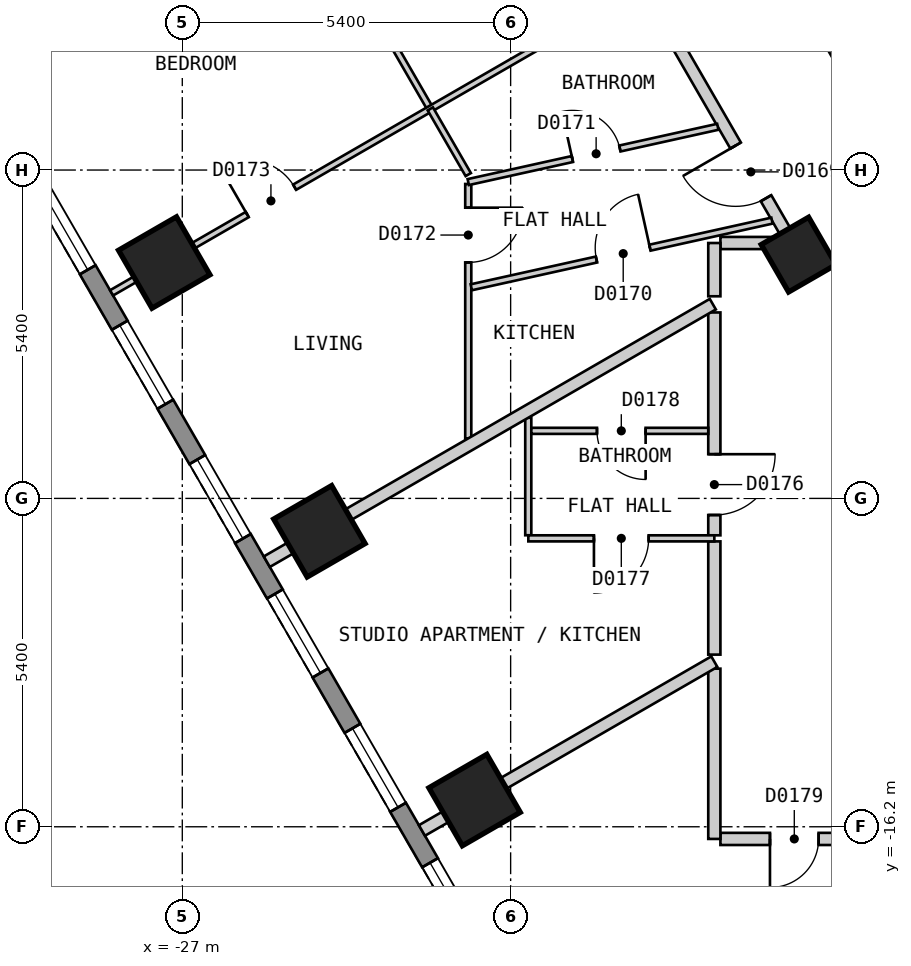
"""IFC4 building model, lengths in metres.
Left out: names, types, materials, properties, quantities, classifications, styles, units other than length and angle.
Written with IfcOpenShell. Run it as: python <this file> out.ifc"""

import sys

from ifc_helpers import new_model, si_unit, direction, frame, frame_2d, origin, origin_2d, place, context, subcontext, project, spatial, polyline, rectangle, outline, extrude, element, fill, save


model = new_model("IFC4")
c1 = context("Model", 3, precision=1e-05, world=origin(), true_north=direction((0.0, 1.0)))
c2 = subcontext(c1, "Body", "Model", "MODEL_VIEW")
j1 = project(units=[si_unit("LENGTHUNIT", "METRE"), si_unit("PLANEANGLEUNIT", "RADIAN")], contexts=[c1])
p1 = place(None, origin())
s1 = spatial("IfcSite", under=j1, at=p1, CompositionType="ELEMENT")
p2 = place(p1, origin())
s2 = spatial("IfcBuilding", under=s1, at=p2, CompositionType="ELEMENT")
p3 = place(p2, frame((0.0, 0.0, 29.4)))
s3 = spatial("IfcBuildingStorey", under=s2, at=p3, CompositionType="ELEMENT", Elevation=29.4)
for number, where, z_axis, x_axis in (
    (1, (-27.297, -6.921, 0.0), (0.0, 0.0, 1.0), (0.5, -0.866, 0.0)),
    (2, (-24.745, -11.341, 0.0), (0.0, 0.0, 1.0), (0.5, -0.866, 0.0)),
    (3, (-22.193, -15.761, 0.0), (0.0, 0.0, 1.0), (0.5, -0.866, 0.0)),
):
    element("IfcColumn", number, at=place(p3, frame(where, z_axis=z_axis, x_axis=x_axis)), inside=s3, PredefinedType="COLUMN", context=c2, shape_type="SweptSolid", body=[
        extrude(rectangle(XDim=1.1, YDim=1.1, at=origin_2d()), origin(), (0.0, 0.0, 1.0), 3.0),
    ])
p4 = place(p3, frame((-16.864, -6.791, 0.0), z_axis=(0.0, 0.0, 1.0), x_axis=(0.499984884929, -0.866034130299, 0.0)))
e4 = element("IfcColumn", 4, at=p4, inside=s3, PredefinedType="COLUMN", context=c2, shape_type="SweptSolid", body=[
    extrude(rectangle(XDim=0.9, YDim=0.9, at=origin_2d()), origin(), (0.0, 0.0, 1.0), 3.0),
])
p5 = place(p3, frame((-31.22, -2.425, 0.0), z_axis=(0.0, 0.0, 1.0), x_axis=(0.500001938803, -0.866024284413, 0.0)))
e5 = element("IfcWall", 5, at=p5, inside=s3, PredefinedType="SOLIDWALL", context=c2, shape_type="SweptSolid", body=[
    extrude(outline(polyline([(0.0, -0.15), (27.02, -0.15), (26.94, 0.15), (0.08, 0.15), (0.0, -0.15)])), origin(), (0.0, 0.0, 1.0), 2.7),
])
p6 = place(p5, frame((1.277, 0.0, 0.15)))
e6 = element("IfcOpeningElement", 6, at=p6, cuts=e5, PredefinedType="OPENING", context=c2, shape_type="SweptSolid", body=[
    extrude(rectangle(XDim=1.5, YDim=2.1, at=frame_2d((0.75, 1.05))), frame((0.0, 0.16, 0.0), z_axis=(0.0, -1.0, 0.0), x_axis=(1.0, 0.0, 0.0)), (0.0, 0.0, 1.0), 0.32),
])
p7 = place(p5, frame((3.829, 0.0, 0.15)))
e7 = element("IfcOpeningElement", 7, at=p7, cuts=e5, PredefinedType="OPENING", context=c2, shape_type="SweptSolid", body=[
    extrude(rectangle(XDim=1.5, YDim=2.1, at=frame_2d((0.75, 1.05))), frame((0.0, 0.16, 0.0), z_axis=(0.0, -1.0, 0.0), x_axis=(1.0, 0.0, 0.0)), (0.0, 0.0, 1.0), 0.32),
])
p8 = place(p5, frame((6.382, 0.0, 0.15)))
e8 = element("IfcOpeningElement", 8, at=p8, cuts=e5, PredefinedType="OPENING", context=c2, shape_type="SweptSolid", body=[
    extrude(rectangle(XDim=1.5, YDim=2.1, at=frame_2d((0.75, 1.05))), frame((0.0, 0.16, 0.0), z_axis=(0.0, -1.0, 0.0), x_axis=(1.0, 0.0, 0.0)), (0.0, 0.0, 1.0), 0.32),
])
p9 = place(p5, frame((8.933, 0.0, 0.15)))
e9 = element("IfcOpeningElement", 9, at=p9, cuts=e5, PredefinedType="OPENING", context=c2, shape_type="SweptSolid", body=[
    extrude(rectangle(XDim=1.5, YDim=2.1, at=frame_2d((0.75, 1.05))), frame((0.0, 0.16, 0.0), z_axis=(0.0, -1.0, 0.0), x_axis=(1.0, 0.0, 0.0)), (0.0, 0.0, 1.0), 0.32),
])
p10 = place(p5, frame((11.485, 0.0, 0.15)))
e10 = element("IfcOpeningElement", 10, at=p10, cuts=e5, PredefinedType="OPENING", context=c2, shape_type="SweptSolid", body=[
    extrude(rectangle(XDim=1.5, YDim=2.1, at=frame_2d((0.75, 1.05))), frame((0.0, 0.16, 0.0), z_axis=(0.0, -1.0, 0.0), x_axis=(1.0, 0.0, 0.0)), (0.0, 0.0, 1.0), 0.32),
])
p11 = place(p5, frame((14.037, 0.0, 0.15)))
e11 = element("IfcOpeningElement", 11, at=p11, cuts=e5, PredefinedType="OPENING", context=c2, shape_type="SweptSolid", body=[
    extrude(rectangle(XDim=1.5, YDim=2.1, at=frame_2d((0.75, 1.05))), frame((0.0, 0.16, 0.0), z_axis=(0.0, -1.0, 0.0), x_axis=(1.0, 0.0, 0.0)), (0.0, 0.0, 1.0), 0.32),
])
p12 = place(p5, frame((16.589, 0.0, 0.15)))
e12 = element("IfcOpeningElement", 12, at=p12, cuts=e5, PredefinedType="OPENING", context=c2, shape_type="SweptSolid", body=[
    extrude(rectangle(XDim=1.5, YDim=2.1, at=frame_2d((0.75, 1.05))), frame((0.0, 0.16, 0.0), z_axis=(0.0, -1.0, 0.0), x_axis=(1.0, 0.0, 0.0)), (0.0, 0.0, 1.0), 0.32),
])
p13 = place(p5, frame((19.141, 0.0, 0.15)))
e13 = element("IfcOpeningElement", 13, at=p13, cuts=e5, PredefinedType="OPENING", context=c2, shape_type="SweptSolid", body=[
    extrude(rectangle(XDim=1.5, YDim=2.1, at=frame_2d((0.75, 1.05))), frame((0.0, 0.16, 0.0), z_axis=(0.0, -1.0, 0.0), x_axis=(1.0, 0.0, 0.0)), (0.0, 0.0, 1.0), 0.32),
])
p14 = place(p5, frame((21.693, 0.0, 0.15)))
e14 = element("IfcOpeningElement", 14, at=p14, cuts=e5, PredefinedType="OPENING", context=c2, shape_type="SweptSolid", body=[
    extrude(rectangle(XDim=1.5, YDim=2.1, at=frame_2d((0.75, 1.05))), frame((0.0, 0.16, 0.0), z_axis=(0.0, -1.0, 0.0), x_axis=(1.0, 0.0, 0.0)), (0.0, 0.0, 1.0), 0.32),
])
p15 = place(p5, frame((24.244, 0.0, 0.15)))
e15 = element("IfcOpeningElement", 15, at=p15, cuts=e5, PredefinedType="OPENING", context=c2, shape_type="SweptSolid", body=[
    extrude(rectangle(XDim=1.5, YDim=2.1, at=frame_2d((0.75, 1.05))), frame((0.0, 0.16, 0.0), z_axis=(0.0, -1.0, 0.0), x_axis=(1.0, 0.0, 0.0)), (0.0, 0.0, 1.0), 0.32),
])
p16 = place(p3, frame((-18.186, -0.101, 0.0), z_axis=(0.0, 0.0, 1.0), x_axis=(0.499997591167, -0.86602679452, 0.0)))
e16 = element("IfcWall", 16, at=p16, inside=s3, PredefinedType="PARTITIONING", context=c2, shape_type="SweptSolid", body=[
    extrude(rectangle(XDim=5.172, YDim=0.2, at=frame_2d((2.586, 0.0))), origin(), (0.0, 0.0, 1.0), 2.7),
])
p17 = place(p3, frame((-20.727, -0.101, 0.0), z_axis=(0.0, 0.0, 1.0), x_axis=(0.500065652488, -0.865987495984, 0.0)))
e17 = element("IfcWall", 17, at=p17, inside=s3, PredefinedType="PARTITIONING", context=c2, shape_type="SweptSolid", body=[
    extrude(rectangle(XDim=7.389, YDim=0.2, at=frame_2d((3.695, 0.0))), origin(), (0.0, 0.0, 1.0), 2.7),
])
p18 = place(p17, frame((5.654, 0.0, 0.0)))
e18 = element("IfcOpeningElement", 18, at=p18, cuts=e17, PredefinedType="OPENING", context=c2, shape_type="SweptSolid", body=[
    extrude(rectangle(XDim=1.0, YDim=2.1, at=frame_2d((0.5, 1.05))), frame((0.0, 0.11, 0.0), z_axis=(0.0, -1.0, 0.0), x_axis=(1.0, 0.0, 0.0)), (0.0, 0.0, 1.0), 0.22),
])
p19 = place(p3, frame((-18.25, -11.507, 0.0), z_axis=(0.0, 0.0, 1.0), x_axis=(0.0, -1.0, 0.0)))
e19 = element("IfcWall", 19, at=p19, inside=s3, PredefinedType="PARTITIONING", context=c2, shape_type="SweptSolid", body=[
    extrude(rectangle(XDim=1.862, YDim=0.2, at=frame_2d((0.931, 0.0))), origin(), (0.0, 0.0, 1.0), 2.7),
])
p20 = place(p3, frame((-18.15, -6.6, 0.0), z_axis=(0.0, 0.0, 1.0), x_axis=(1.0, 0.0, 0.0)))
e20 = element("IfcWall", 20, at=p20, inside=s3, PredefinedType="PARTITIONING", context=c2, shape_type="SweptSolid", body=[
    extrude(rectangle(XDim=1.176, YDim=0.2, at=frame_2d((0.588, 0.0))), origin(), (0.0, 0.0, 1.0), 2.7),
])
p21 = place(p3, frame((-18.15, -16.4, 0.0), z_axis=(0.0, 0.0, 1.0), x_axis=(1.0, 0.0, 0.0)))
e21 = element("IfcWall", 21, at=p21, inside=s3, PredefinedType="PARTITIONING", context=c2, shape_type="SweptSolid", body=[
    extrude(rectangle(XDim=2.55, YDim=0.2, at=frame_2d((1.275, 0.0))), origin(), (0.0, 0.0, 1.0), 2.7),
])
p22 = place(p21, frame((0.815, 0.0, 0.0)))
e22 = element("IfcOpeningElement", 22, at=p22, cuts=e21, PredefinedType="OPENING", context=c2, shape_type="SweptSolid", body=[
    extrude(rectangle(XDim=0.8, YDim=2.1, at=frame_2d((0.4, 1.05))), frame((0.0, 0.11, 0.0), z_axis=(0.0, -1.0, 0.0), x_axis=(1.0, 0.0, 0.0)), (0.0, 0.0, 1.0), 0.22),
])
p23 = place(p3, frame((-18.25, -16.4, 0.0), z_axis=(0.0, 0.0, 1.0), x_axis=(0.0, 1.0, 0.0)))
e23 = element("IfcWall", 23, at=p23, inside=s3, PredefinedType="PARTITIONING", context=c2, shape_type="SweptSolid", body=[
    extrude(rectangle(XDim=2.8, YDim=0.2, at=frame_2d((1.4, 0.0))), origin(), (0.0, 0.0, 1.0), 2.7),
])
p24 = place(p3, frame((-18.25, -11.407, 0.0), z_axis=(0.0, 0.0, 1.0), x_axis=(0.0, 1.0, 0.0)))
e24 = element("IfcWall", 24, at=p24, inside=s3, PredefinedType="PARTITIONING", context=c2, shape_type="SweptSolid", body=[
    extrude(rectangle(XDim=3.665, YDim=0.2, at=frame_2d((1.833, 0.0))), origin(), (0.0, 0.0, 1.0), 2.7),
])
p25 = place(p24, frame((0.334, 0.0, 0.0)))
e25 = element("IfcOpeningElement", 25, at=p25, cuts=e24, PredefinedType="OPENING", context=c2, shape_type="SweptSolid", body=[
    extrude(rectangle(XDim=1.0, YDim=2.1, at=frame_2d((0.5, 1.05))), frame((0.0, 0.11, 0.0), z_axis=(0.0, -1.0, 0.0), x_axis=(1.0, 0.0, 0.0)), (0.0, 0.0, 1.0), 0.22),
])
p26 = place(p3, frame((-18.25, -7.476, 0.0), z_axis=(0.0, 0.0, 1.0), x_axis=(0.0, 1.0, 0.0)))
e26 = element("IfcWall", 26, at=p26, inside=s3, PredefinedType="PARTITIONING", context=c2, shape_type="SweptSolid", body=[
    extrude(rectangle(XDim=0.876, YDim=0.2, at=frame_2d((0.438, 0.0))), origin(), (0.0, 0.0, 1.0), 2.7),
])
p27 = place(p3, frame((-25.358, -0.174, 0.0), z_axis=(0.0, 0.0, 1.0), x_axis=(0.500093956194, -0.865971151354, 0.0)))
e27 = element("IfcWall", 27, at=p27, inside=s3, PredefinedType="PARTITIONING", context=c2, shape_type="SweptSolid", body=[
    extrude(rectangle(XDim=4.873, YDim=0.1, at=frame_2d((2.437, 0.0))), origin(), (0.0, 0.0, 1.0), 2.7),
])
p28 = place(p27, frame((1.937, 0.0, 0.0)))
e28 = element("IfcOpeningElement", 28, at=p28, cuts=e27, PredefinedType="OPENING", context=c2, shape_type="SweptSolid", body=[
    extrude(rectangle(XDim=0.8, YDim=2.1, at=frame_2d((0.4, 1.05))), frame((0.0, 0.06, 0.0), z_axis=(0.0, -1.0, 0.0), x_axis=(1.0, 0.0, 0.0)), (0.0, 0.0, 1.0), 0.12),
])
p29 = place(p3, frame((-21.31, -9.474, 0.0), z_axis=(0.0, 0.0, 1.0), x_axis=(0.0, -1.0, 0.0)))
e29 = element("IfcWall", 29, at=p29, inside=s3, PredefinedType="PARTITIONING", context=c2, shape_type="SweptSolid", body=[
    extrude(rectangle(XDim=1.932, YDim=0.1, at=frame_2d((0.966, 0.0))), origin(), (0.0, 0.0, 1.0), 2.7),
])
p30 = place(p3, frame((-21.26, -9.689, 0.0), z_axis=(0.0, 0.0, 1.0), x_axis=(1.0, 0.0, 0.0)))
e30 = element("IfcWall", 30, at=p30, inside=s3, PredefinedType="PARTITIONING", context=c2, shape_type="SweptSolid", body=[
    extrude(rectangle(XDim=2.91, YDim=0.1, at=frame_2d((1.455, 0.0))), origin(), (0.0, 0.0, 1.0), 2.7),
])
p31 = place(p30, frame((1.08, 0.0, 0.0)))
e31 = element("IfcOpeningElement", 31, at=p31, cuts=e30, PredefinedType="OPENING", context=c2, shape_type="SweptSolid", body=[
    extrude(rectangle(XDim=0.8, YDim=2.1, at=frame_2d((0.4, 1.05))), frame((0.0, 0.06, 0.0), z_axis=(0.0, -1.0, 0.0), x_axis=(1.0, 0.0, 0.0)), (0.0, 0.0, 1.0), 0.12),
])
p32 = place(p3, frame((-21.309, -11.457, 0.0), z_axis=(0.0, 0.0, 1.0), x_axis=(1.0, 0.0, 0.0)))
e32 = element("IfcWall", 32, at=p32, inside=s3, PredefinedType="PARTITIONING", context=c2, shape_type="SweptSolid", body=[
    extrude(rectangle(XDim=3.059, YDim=0.1, at=frame_2d((1.53, 0.0))), origin(), (0.0, 0.0, 1.0), 2.7),
])
p33 = place(p32, frame((1.079, 0.0, 0.0)))
e33 = element("IfcOpeningElement", 33, at=p33, cuts=e32, PredefinedType="OPENING", context=c2, shape_type="SweptSolid", body=[
    extrude(rectangle(XDim=0.9, YDim=2.1, at=frame_2d((0.45, 1.05))), frame((0.0, 0.06, 0.0), z_axis=(0.0, -1.0, 0.0), x_axis=(1.0, 0.0, 0.0)), (0.0, 0.0, 1.0), 0.12),
])
p34 = place(p3, frame((-22.297, -9.813, 0.0), z_axis=(0.0, 0.0, 1.0), x_axis=(0.0, 1.0, 0.0)))
e34 = element("IfcWall", 34, at=p34, inside=s3, PredefinedType="PARTITIONING", context=c2, shape_type="SweptSolid", body=[
    extrude(rectangle(XDim=4.184, YDim=0.1, at=frame_2d((2.092, 0.0))), origin(), (0.0, 0.0, 1.0), 2.7),
])
p35 = place(p34, frame((2.894, 0.0, 0.0)))
e35 = element("IfcOpeningElement", 35, at=p35, cuts=e34, PredefinedType="OPENING", context=c2, shape_type="SweptSolid", body=[
    extrude(rectangle(XDim=0.9, YDim=2.1, at=frame_2d((0.45, 1.05))), frame((0.0, 0.06, 0.0), z_axis=(0.0, -1.0, 0.0), x_axis=(1.0, 0.0, 0.0)), (0.0, 0.0, 1.0), 0.12),
])
p36 = place(p3, frame((-22.297, -5.598, 0.0), z_axis=(0.0, 0.0, 1.0), x_axis=(0.976341239907, 0.216235481033, 0.0)))
e36 = element("IfcWall", 36, at=p36, inside=s3, PredefinedType="PARTITIONING", context=c2, shape_type="SweptSolid", body=[
    extrude(rectangle(XDim=4.203, YDim=0.1, at=frame_2d((2.102, 0.0))), origin(), (0.0, 0.0, 1.0), 2.7),
])
p37 = place(p36, frame((1.754, 0.0, 0.0)))
e37 = element("IfcOpeningElement", 37, at=p37, cuts=e36, PredefinedType="OPENING", context=c2, shape_type="SweptSolid", body=[
    extrude(rectangle(XDim=0.8, YDim=2.1, at=frame_2d((0.4, 1.05))), frame((0.0, 0.06, 0.0), z_axis=(0.0, -1.0, 0.0), x_axis=(1.0, 0.0, 0.0)), (0.0, 0.0, 1.0), 0.12),
])
p38 = place(p3, frame((-22.247, -7.328, 0.0), z_axis=(0.0, 0.0, 1.0), x_axis=(0.976310522972, 0.216374126765, 0.0)))
e38 = element("IfcWall", 38, at=p38, inside=s3, PredefinedType="PARTITIONING", context=c2, shape_type="SweptSolid", body=[
    extrude(rectangle(XDim=5.065, YDim=0.1, at=frame_2d((2.532, 0.0))), origin(), (0.0, 0.0, 1.0), 2.7),
])
p39 = place(p38, frame((2.109, 0.0, 0.0)))
e39 = element("IfcOpeningElement", 39, at=p39, cuts=e38, PredefinedType="OPENING", context=c2, shape_type="SweptSolid", body=[
    extrude(rectangle(XDim=0.9, YDim=2.1, at=frame_2d((0.45, 1.05))), frame((0.0, 0.06, 0.0), z_axis=(0.0, -1.0, 0.0), x_axis=(1.0, 0.0, 0.0)), (0.0, 0.0, 1.0), 0.12),
])
p40 = place(p3, frame((-28.163, -7.42, 0.0), z_axis=(0.0, 0.0, 1.0), x_axis=(0.866065245018, 0.499930986609, 0.0)))
e40 = element("IfcWall", 40, at=p40, inside=s3, PredefinedType="PARTITIONING", context=c2, shape_type="SweptSolid", body=[
    extrude(rectangle(XDim=10.0, YDim=0.1, at=frame_2d((5.0, 0.0))), origin(), (0.0, 0.0, 1.0), 2.7),
])
p41 = place(p40, frame((2.576, 0.0, 0.0)))
e41 = element("IfcOpeningElement", 41, at=p41, cuts=e40, PredefinedType="OPENING", context=c2, shape_type="SweptSolid", body=[
    extrude(rectangle(XDim=0.9, YDim=2.1, at=frame_2d((0.45, 1.05))), frame((0.0, 0.06, 0.0), z_axis=(0.0, -1.0, 0.0), x_axis=(1.0, 0.0, 0.0)), (0.0, 0.0, 1.0), 0.12),
])
p42 = place(p3, frame((-23.059, -16.261, 0.0), z_axis=(0.0, 0.0, 1.0), x_axis=(0.866075767886, 0.499912756669, 0.0)))
e42 = element("IfcWall", 42, at=p42, inside=s3, PredefinedType="PARTITIONING", context=c2, shape_type="SweptSolid", body=[
    extrude(rectangle(XDim=5.553, YDim=0.2, at=frame_2d((2.776, 0.0))), origin(), (0.0, 0.0, 1.0), 2.7),
])
p43 = place(p3, frame((-25.61, -11.841, 0.0), z_axis=(0.0, 0.0, 1.0), x_axis=(0.866019023803, 0.500011050288, 0.0)))
e43 = element("IfcWall", 43, at=p43, inside=s3, PredefinedType="PARTITIONING", context=c2, shape_type="SweptSolid", body=[
    extrude(rectangle(XDim=8.47, YDim=0.2, at=frame_2d((4.235, 0.0))), origin(), (0.0, 0.0, 1.0), 2.7),
])
p44 = place(p3, frame((-22.921, -4.394, 0.0), z_axis=(0.0, 0.0, 1.0), x_axis=(0.49977889874, -0.86615301903, 0.0)))
e44 = element("IfcWall", 44, at=p44, inside=s3, PredefinedType="PARTITIONING", context=c2, shape_type="SweptSolid", body=[
    extrude(rectangle(XDim=1.248, YDim=0.1, at=frame_2d((0.624, 0.0))), origin(), (0.0, 0.0, 1.0), 2.7),
])
p45 = place(p7, origin())
e45 = element("IfcWindow", 45, at=p45, inside=s3, PartitioningType="SINGLE_PANEL", PredefinedType="WINDOW", context=c2, shape_type="SweptSolid", body=[
    extrude(rectangle(XDim=1.5, YDim=2.1, at=frame_2d((0.75, 1.05))), frame((0.0, 0.03, 0.0), z_axis=(0.0, -1.0, 0.0), x_axis=(1.0, 0.0, 0.0)), (0.0, 0.0, 1.0), 0.06),
])
fill(e7, e45)
p46 = place(p8, origin())
e46 = element("IfcWindow", 46, at=p46, inside=s3, PartitioningType="SINGLE_PANEL", PredefinedType="WINDOW", context=c2, shape_type="SweptSolid", body=[
    extrude(rectangle(XDim=1.5, YDim=2.1, at=frame_2d((0.75, 1.05))), frame((0.0, 0.03, 0.0), z_axis=(0.0, -1.0, 0.0), x_axis=(1.0, 0.0, 0.0)), (0.0, 0.0, 1.0), 0.06),
])
fill(e8, e46)
p47 = place(p9, origin())
e47 = element("IfcWindow", 47, at=p47, inside=s3, PartitioningType="SINGLE_PANEL", PredefinedType="WINDOW", context=c2, shape_type="SweptSolid", body=[
    extrude(rectangle(XDim=1.5, YDim=2.1, at=frame_2d((0.75, 1.05))), frame((0.0, 0.03, 0.0), z_axis=(0.0, -1.0, 0.0), x_axis=(1.0, 0.0, 0.0)), (0.0, 0.0, 1.0), 0.06),
])
fill(e9, e47)
p48 = place(p10, origin())
e48 = element("IfcWindow", 48, at=p48, inside=s3, PartitioningType="SINGLE_PANEL", PredefinedType="WINDOW", context=c2, shape_type="SweptSolid", body=[
    extrude(rectangle(XDim=1.5, YDim=2.1, at=frame_2d((0.75, 1.05))), frame((0.0, 0.03, 0.0), z_axis=(0.0, -1.0, 0.0), x_axis=(1.0, 0.0, 0.0)), (0.0, 0.0, 1.0), 0.06),
])
fill(e10, e48)
p49 = place(p11, origin())
e49 = element("IfcWindow", 49, at=p49, inside=s3, PartitioningType="SINGLE_PANEL", PredefinedType="WINDOW", context=c2, shape_type="SweptSolid", body=[
    extrude(rectangle(XDim=1.5, YDim=2.1, at=frame_2d((0.75, 1.05))), frame((0.0, 0.03, 0.0), z_axis=(0.0, -1.0, 0.0), x_axis=(1.0, 0.0, 0.0)), (0.0, 0.0, 1.0), 0.06),
])
fill(e11, e49)
p50 = place(p12, origin())
e50 = element("IfcWindow", 50, at=p50, inside=s3, PartitioningType="SINGLE_PANEL", PredefinedType="WINDOW", context=c2, shape_type="SweptSolid", body=[
    extrude(rectangle(XDim=1.5, YDim=2.1, at=frame_2d((0.75, 1.05))), frame((0.0, 0.03, 0.0), z_axis=(0.0, -1.0, 0.0), x_axis=(1.0, 0.0, 0.0)), (0.0, 0.0, 1.0), 0.06),
])
fill(e12, e50)
p51 = place(p18, origin())
e51 = element("IfcDoor", 51, at=p51, inside=s3, OperationType="SINGLE_SWING_LEFT", PredefinedType="DOOR", context=c2, shape_type="SweptSolid", body=[
    extrude(rectangle(XDim=1.0, YDim=2.1, at=frame_2d((0.5, 1.05))), frame((0.0, 0.025, 0.0), z_axis=(0.0, -1.0, 0.0), x_axis=(1.0, 0.0, 0.0)), (0.0, 0.0, 1.0), 0.05),
])
fill(e18, e51)
p52 = place(p39, origin())
e52 = element("IfcDoor", 52, at=p52, inside=s3, OperationType="SINGLE_SWING_RIGHT", PredefinedType="DOOR", context=c2, shape_type="SweptSolid", body=[
    extrude(rectangle(XDim=0.9, YDim=2.1, at=frame_2d((0.45, 1.05))), frame((0.0, 0.025, 0.0), z_axis=(0.0, -1.0, 0.0), x_axis=(1.0, 0.0, 0.0)), (0.0, 0.0, 1.0), 0.05),
])
fill(e39, e52)
p53 = place(p37, origin())
e53 = element("IfcDoor", 53, at=p53, inside=s3, OperationType="SINGLE_SWING_LEFT", PredefinedType="DOOR", context=c2, shape_type="SweptSolid", body=[
    extrude(rectangle(XDim=0.8, YDim=2.1, at=frame_2d((0.4, 1.05))), frame((0.0, 0.025, 0.0), z_axis=(0.0, -1.0, 0.0), x_axis=(1.0, 0.0, 0.0)), (0.0, 0.0, 1.0), 0.05),
])
fill(e37, e53)
p54 = place(p35, origin())
e54 = element("IfcDoor", 54, at=p54, inside=s3, OperationType="SINGLE_SWING_RIGHT", PredefinedType="DOOR", context=c2, shape_type="SweptSolid", body=[
    extrude(rectangle(XDim=0.9, YDim=2.1, at=frame_2d((0.45, 1.05))), frame((0.0, 0.025, 0.0), z_axis=(0.0, -1.0, 0.0), x_axis=(1.0, 0.0, 0.0)), (0.0, 0.0, 1.0), 0.05),
])
fill(e35, e54)
p55 = place(p41, origin())
e55 = element("IfcDoor", 55, at=p55, inside=s3, OperationType="SINGLE_SWING_LEFT", PredefinedType="DOOR", context=c2, shape_type="SweptSolid", body=[
    extrude(rectangle(XDim=0.9, YDim=2.1, at=frame_2d((0.45, 1.05))), frame((0.0, 0.025, 0.0), z_axis=(0.0, -1.0, 0.0), x_axis=(1.0, 0.0, 0.0)), (0.0, 0.0, 1.0), 0.05),
])
fill(e41, e55)
p56 = place(p25, origin())
e56 = element("IfcDoor", 56, at=p56, inside=s3, OperationType="SINGLE_SWING_RIGHT", PredefinedType="DOOR", context=c2, shape_type="SweptSolid", body=[
    extrude(rectangle(XDim=1.0, YDim=2.1, at=frame_2d((0.5, 1.05))), frame((0.0, 0.025, 0.0), z_axis=(0.0, -1.0, 0.0), x_axis=(1.0, 0.0, 0.0)), (0.0, 0.0, 1.0), 0.05),
])
fill(e25, e56)
p57 = place(p33, origin())
e57 = element("IfcDoor", 57, at=p57, inside=s3, OperationType="SINGLE_SWING_LEFT", PredefinedType="DOOR", context=c2, shape_type="SweptSolid", body=[
    extrude(rectangle(XDim=0.9, YDim=2.1, at=frame_2d((0.45, 1.05))), frame((0.0, 0.025, 0.0), z_axis=(0.0, -1.0, 0.0), x_axis=(1.0, 0.0, 0.0)), (0.0, 0.0, 1.0), 0.05),
])
fill(e33, e57)
p58 = place(p31, origin())
e58 = element("IfcDoor", 58, at=p58, inside=s3, OperationType="SINGLE_SWING_RIGHT", PredefinedType="DOOR", context=c2, shape_type="SweptSolid", body=[
    extrude(rectangle(XDim=0.8, YDim=2.1, at=frame_2d((0.4, 1.05))), frame((0.0, 0.025, 0.0), z_axis=(0.0, -1.0, 0.0), x_axis=(1.0, 0.0, 0.0)), (0.0, 0.0, 1.0), 0.05),
])
fill(e31, e58)
p59 = place(p22, origin())
e59 = element("IfcDoor", 59, at=p59, inside=s3, OperationType="SINGLE_SWING_LEFT", PredefinedType="DOOR", context=c2, shape_type="SweptSolid", body=[
    extrude(rectangle(XDim=0.8, YDim=2.1, at=frame_2d((0.4, 1.05))), frame((0.0, 0.025, 0.0), z_axis=(0.0, -1.0, 0.0), x_axis=(1.0, 0.0, 0.0)), (0.0, 0.0, 1.0), 0.05),
])
fill(e22, e59)
save(model, sys.argv[1])
